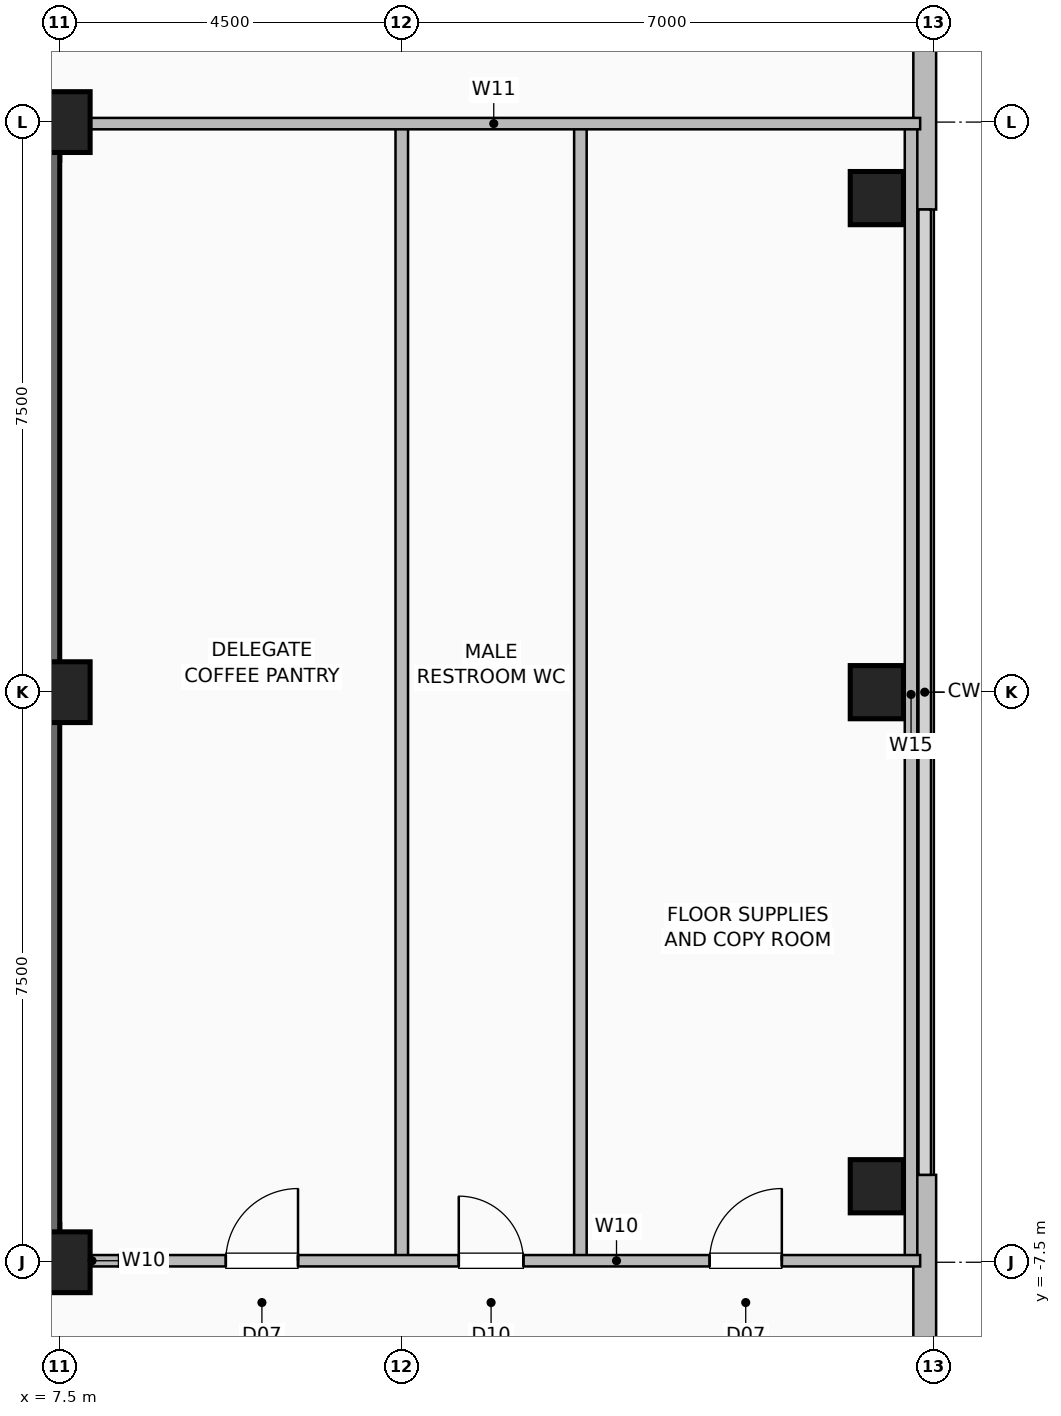
"""IFC4 building model, lengths in metres.
Left out: names, types, materials, properties, quantities, classifications, styles, units other than length and angle.
Written with IfcOpenShell. Run it as: python <this file> out.ifc"""

import sys

from ifc_helpers import new_model, si_unit, direction, frame, frame_2d, origin, origin_2d, place, context, subcontext, project, spatial, rectangle, hollow_rectangle, extrude, element, fill, save


model = new_model("IFC4")
c1 = context("Model", 3, precision=1e-05, world=origin(), true_north=direction((0.0, 1.0)))
c2 = subcontext(c1, "Body", "Model", "MODEL_VIEW")
j1 = project(units=[si_unit("LENGTHUNIT", "METRE"), si_unit("PLANEANGLEUNIT", "RADIAN")], contexts=[c1])
p1 = place(None, origin())
s1 = spatial("IfcSite", under=j1, at=p1, CompositionType="ELEMENT")
p2 = place(p1, origin())
s2 = spatial("IfcBuilding", under=s1, at=p2, CompositionType="ELEMENT")
p3 = place(p2, frame((0.0, 0.0, 246.8)))
s3 = spatial("IfcBuildingStorey", under=s2, at=p3, CompositionType="ELEMENT", Elevation=246.8)
for number, where, z_axis, x_axis in (
    (1, (7.5, -7.5, 0.0), (0.0, 0.0, 1.0), (1.0, 0.0, 0.0)),
    (2, (7.5, 0.0, 0.0), (0.0, 0.0, 1.0), (1.0, 0.0, 0.0)),
    (3, (7.5, 7.5, 0.0), (0.0, 0.0, 1.0), (1.0, 0.0, 0.0)),
):
    element("IfcColumn", number, at=place(p3, frame(where, z_axis=z_axis, x_axis=x_axis)), inside=s3, PredefinedType="COLUMN", context=c2, shape_type="SweptSolid", body=[
        extrude(hollow_rectangle(XDim=0.8, YDim=0.8, WallThickness=0.04, at=origin_2d()), origin(), (0.0, 0.0, 1.0), 3.6),
    ])
for number, where, z_axis, x_axis in (
    (4, (18.25, -6.5, 0.0), (0.0, 0.0, 1.0), (1.0, 0.0, 0.0)),
    (5, (18.25, 0.0, 0.0), (0.0, 0.0, 1.0), (1.0, 0.0, 0.0)),
    (6, (18.25, 6.5, 0.0), (0.0, 0.0, 1.0), (1.0, 0.0, 0.0)),
):
    element("IfcColumn", number, at=place(p3, frame(where, z_axis=z_axis, x_axis=x_axis)), inside=s3, PredefinedType="COLUMN", context=c2, shape_type="SweptSolid", body=[
        extrude(hollow_rectangle(XDim=0.7, YDim=0.7, WallThickness=0.035, at=origin_2d()), origin(), (0.0, 0.0, 1.0), 3.6),
    ])
for number, where, z_axis, x_axis in (
    (7, (18.88, -11.65, 0.0), (0.0, 0.0, 1.0), (0.0, 1.0, 0.0)),
    (8, (18.88, 6.35, 0.0), (0.0, 0.0, 1.0), (0.0, 1.0, 0.0)),
):
    element("IfcWall", number, at=place(p3, frame(where, z_axis=z_axis, x_axis=x_axis)), inside=s3, PredefinedType="SOLIDWALL", context=c2, shape_type="SweptSolid", body=[
        extrude(rectangle(XDim=5.3, YDim=0.3, at=frame_2d((2.65, 0.0))), origin(), (0.0, 0.0, 1.0), 3.36),
    ])
p4 = place(p3, frame((-7.5, -7.25, 0.0), z_axis=(0.0, 0.0, 1.0), x_axis=(1.0, 0.0, 0.0)))
e9 = element("IfcWall", 9, at=p4, inside=s3, PredefinedType="SHEAR", context=c2, shape_type="SweptSolid", body=[
    extrude(rectangle(XDim=15.0, YDim=0.5, at=frame_2d((7.5, 0.0))), origin(), (0.0, 0.0, 1.0), 3.36),
])
p5 = place(p4, frame((1.55, 0.0, 0.0)))
e10 = element("IfcOpeningElement", 10, at=p5, cuts=e9, PredefinedType="OPENING", context=c2, shape_type="SweptSolid", body=[
    extrude(rectangle(XDim=1.05, YDim=2.08, at=frame_2d((0.525, 1.04))), frame((0.0, 0.26, 0.0), z_axis=(0.0, -1.0, 0.0), x_axis=(1.0, 0.0, 0.0)), (0.0, 0.0, 1.0), 0.52),
])
p6 = place(p4, frame((12.4, 0.0, 0.0)))
e11 = element("IfcOpeningElement", 11, at=p6, cuts=e9, PredefinedType="OPENING", context=c2, shape_type="SweptSolid", body=[
    extrude(rectangle(XDim=1.05, YDim=2.08, at=frame_2d((0.525, 1.04))), frame((0.0, 0.26, 0.0), z_axis=(0.0, -1.0, 0.0), x_axis=(1.0, 0.0, 0.0)), (0.0, 0.0, 1.0), 0.52),
])
p7 = place(p4, frame((5.2, 0.0, 0.0)))
e12 = element("IfcOpeningElement", 12, at=p7, cuts=e9, PredefinedType="OPENING", context=c2, shape_type="SweptSolid", body=[
    extrude(rectangle(XDim=1.0, YDim=2.08, at=frame_2d((0.5, 1.04))), frame((0.0, 0.26, 0.0), z_axis=(0.0, -1.0, 0.0), x_axis=(1.0, 0.0, 0.0)), (0.0, 0.0, 1.0), 0.52),
])
p8 = place(p4, frame((8.65, 0.0, 0.0)))
e13 = element("IfcOpeningElement", 13, at=p8, cuts=e9, PredefinedType="OPENING", context=c2, shape_type="SweptSolid", body=[
    extrude(rectangle(XDim=1.0, YDim=2.08, at=frame_2d((0.5, 1.04))), frame((0.0, 0.26, 0.0), z_axis=(0.0, -1.0, 0.0), x_axis=(1.0, 0.0, 0.0)), (0.0, 0.0, 1.0), 0.52),
])
for number, where, z_axis, x_axis in (
    (14, (-7.5, 7.25, 0.0), (0.0, 0.0, 1.0), (1.0, 0.0, 0.0)),
    (15, (7.25, -7.5, 0.0), (0.0, 0.0, 1.0), (0.0, 1.0, 0.0)),
):
    element("IfcWall", number, at=place(p3, frame(where, z_axis=z_axis, x_axis=x_axis)), inside=s3, PredefinedType="SHEAR", context=c2, shape_type="SweptSolid", body=[
        extrude(rectangle(XDim=15.0, YDim=0.5, at=frame_2d((7.5, 0.0))), origin(), (0.0, 0.0, 1.0), 3.36),
    ])
p9 = place(p3, frame((7.45, -7.48, 0.0), z_axis=(0.0, 0.0, 1.0), x_axis=(1.0, 0.0, 0.0)))
e16 = element("IfcWall", 16, at=p9, inside=s3, PredefinedType="PARTITIONING", context=c2, shape_type="SweptSolid", body=[
    extrude(rectangle(XDim=0.95, YDim=0.15, at=frame_2d((0.475, 0.0))), origin(), (0.0, 0.0, 1.0), 3.36),
])
for number, where, z_axis, x_axis in (
    (17, (14.35, -7.48, 0.0), (0.0, 0.0, 1.0), (0.0, 1.0, 0.0)),
    (18, (12.0, -7.48, 0.0), (0.0, 0.0, 1.0), (0.0, 1.0, 0.0)),
    (19, (18.7, -7.48, 0.0), (0.0, 0.0, 1.0), (0.0, 1.0, 0.0)),
):
    element("IfcWall", number, at=place(p3, frame(where, z_axis=z_axis, x_axis=x_axis)), inside=s3, PredefinedType="PLUMBINGWALL", context=c2, shape_type="SweptSolid", body=[
        extrude(rectangle(XDim=14.9, YDim=0.165, at=frame_2d((7.45, 0.0))), origin(), (0.0, 0.0, 1.0), 3.36),
    ])
p10 = place(p3, frame((8.28, -7.48, 0.0), z_axis=(0.0, 0.0, 1.0), x_axis=(1.0, 0.0, 0.0)))
e20 = element("IfcWall", 20, at=p10, inside=s3, PredefinedType="PARTITIONING", context=c2, shape_type="SweptSolid", body=[
    extrude(rectangle(XDim=10.54, YDim=0.15, at=frame_2d((5.27, 0.0))), origin(), (0.0, 0.0, 1.0), 3.36),
])
p11 = place(p10, frame((1.405, 0.0, 0.0)))
e21 = element("IfcOpeningElement", 21, at=p11, cuts=e20, PredefinedType="OPENING", context=c2, shape_type="SweptSolid", body=[
    extrude(rectangle(XDim=0.95, YDim=2.06, at=frame_2d((0.475, 1.03))), frame((0.0, 0.085, 0.0), z_axis=(0.0, -1.0, 0.0), x_axis=(1.0, 0.0, 0.0)), (0.0, 0.0, 1.0), 0.17),
])
p12 = place(p10, frame((4.47, 0.0, 0.0)))
e22 = element("IfcOpeningElement", 22, at=p12, cuts=e20, PredefinedType="OPENING", context=c2, shape_type="SweptSolid", body=[
    extrude(rectangle(XDim=0.85, YDim=2.05, at=frame_2d((0.425, 1.025))), frame((0.0, 0.085, 0.0), z_axis=(0.0, -1.0, 0.0), x_axis=(1.0, 0.0, 0.0)), (0.0, 0.0, 1.0), 0.17),
])
p13 = place(p10, frame((7.77, 0.0, 0.0)))
e23 = element("IfcOpeningElement", 23, at=p13, cuts=e20, PredefinedType="OPENING", context=c2, shape_type="SweptSolid", body=[
    extrude(rectangle(XDim=0.95, YDim=2.06, at=frame_2d((0.475, 1.03))), frame((0.0, 0.085, 0.0), z_axis=(0.0, -1.0, 0.0), x_axis=(1.0, 0.0, 0.0)), (0.0, 0.0, 1.0), 0.17),
])
p14 = place(p3, frame((7.6, 7.48, 0.0), z_axis=(0.0, 0.0, 1.0), x_axis=(1.0, 0.0, 0.0)))
e24 = element("IfcWall", 24, at=p14, inside=s3, PredefinedType="PARTITIONING", context=c2, shape_type="SweptSolid", body=[
    extrude(rectangle(XDim=11.22, YDim=0.15, at=frame_2d((5.61, 0.0))), origin(), (0.0, 0.0, 1.0), 3.36),
])
p15 = place(p11, origin())
e25 = element("IfcDoor", 25, at=p15, inside=s3, OperationType="SINGLE_SWING_RIGHT", PredefinedType="DOOR", context=c2, shape_type="SweptSolid", body=[
    extrude(rectangle(XDim=0.95, YDim=2.06, at=frame_2d((0.475, 1.03))), frame((0.0, 0.025, 0.0), z_axis=(0.0, -1.0, 0.0), x_axis=(1.0, 0.0, 0.0)), (0.0, 0.0, 1.0), 0.05),
])
fill(e21, e25)
p16 = place(p12, origin())
e26 = element("IfcDoor", 26, at=p16, inside=s3, OperationType="SINGLE_SWING_LEFT", PredefinedType="DOOR", context=c2, shape_type="SweptSolid", body=[
    extrude(rectangle(XDim=0.85, YDim=2.05, at=frame_2d((0.425, 1.025))), frame((0.0, 0.025, 0.0), z_axis=(0.0, -1.0, 0.0), x_axis=(1.0, 0.0, 0.0)), (0.0, 0.0, 1.0), 0.05),
])
fill(e22, e26)
p17 = place(p13, origin())
e27 = element("IfcDoor", 27, at=p17, inside=s3, OperationType="SINGLE_SWING_RIGHT", PredefinedType="DOOR", context=c2, shape_type="SweptSolid", body=[
    extrude(rectangle(XDim=0.95, YDim=2.06, at=frame_2d((0.475, 1.03))), frame((0.0, 0.025, 0.0), z_axis=(0.0, -1.0, 0.0), x_axis=(1.0, 0.0, 0.0)), (0.0, 0.0, 1.0), 0.05),
])
fill(e23, e27)
save(model, sys.argv[1])
